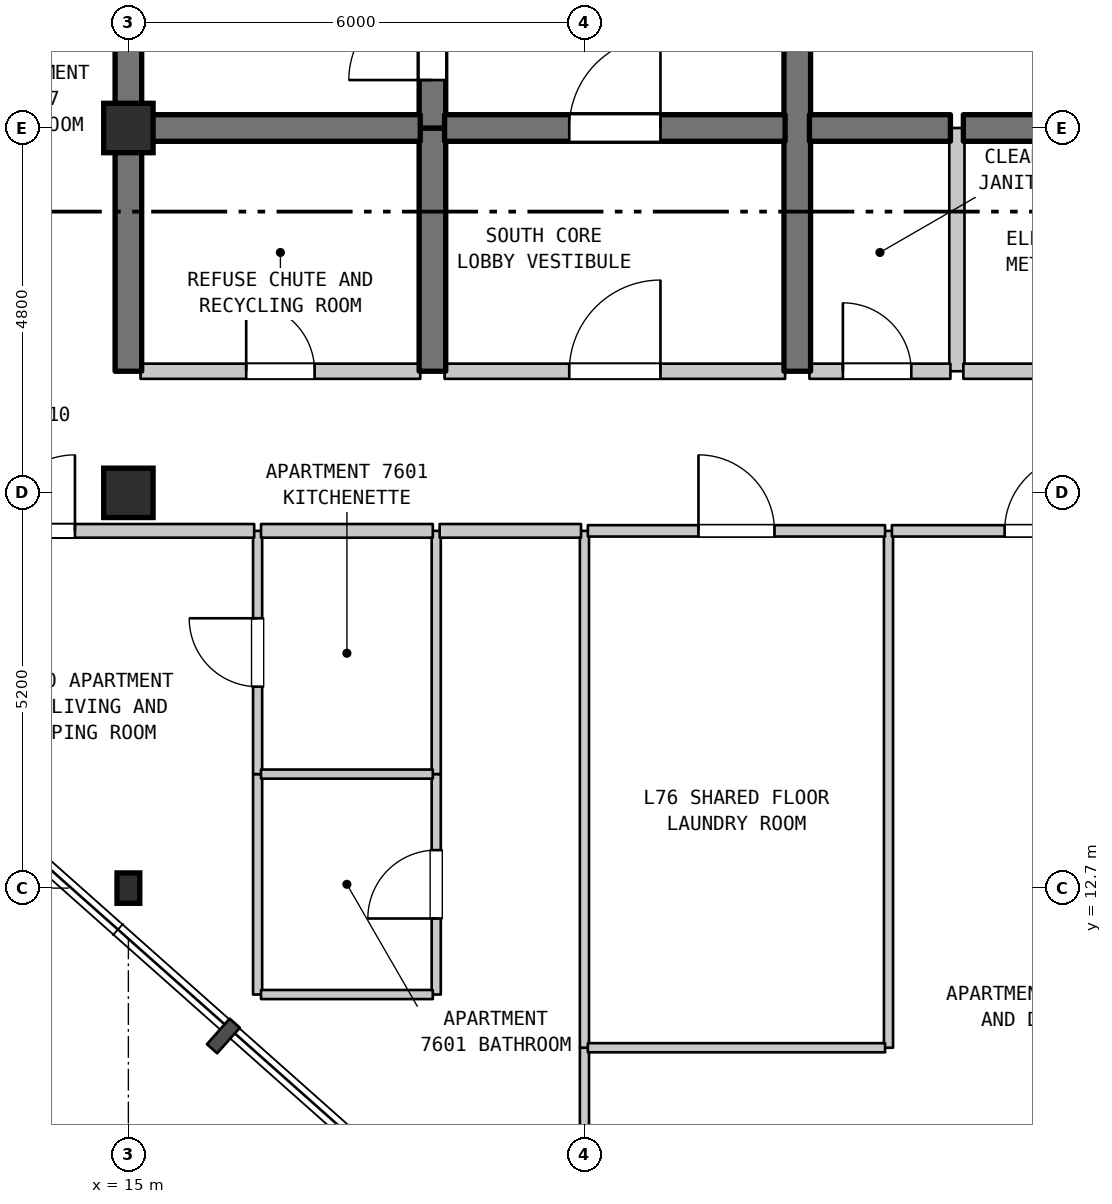
"""IFC4 building model, lengths in metres.
Left out: names, types, materials, properties, quantities, classifications, styles, units other than length and angle.
Written with IfcOpenShell. Run it as: python <this file> out.ifc"""

import sys

from ifc_helpers import new_model, si_unit, direction, frame, frame_2d, origin, origin_2d, place, context, subcontext, project, spatial, rectangle, i_section, extrude, element, fill, save


model = new_model("IFC4")
c1 = context("Model", 3, precision=1e-05, world=origin(), true_north=direction((0.0, 1.0)))
c2 = subcontext(c1, "Body", "Model", "MODEL_VIEW")
j1 = project(units=[si_unit("LENGTHUNIT", "METRE"), si_unit("PLANEANGLEUNIT", "RADIAN")], contexts=[c1])
p1 = place(None, origin())
s1 = spatial("IfcSite", under=j1, at=p1, CompositionType="ELEMENT")
p2 = place(p1, origin())
s2 = spatial("IfcBuilding", under=s1, at=p2, CompositionType="ELEMENT")
p3 = place(p2, frame((0.0, 0.0, 303.6)))
s3 = spatial("IfcBuildingStorey", under=s2, at=p3, CompositionType="ELEMENT", Elevation=303.6)
p4 = place(p3, frame((15.0, 12.7, 0.0), z_axis=(0.0, 0.0, 1.0), x_axis=(1.0, 0.0, 0.0)))
e1 = element("IfcColumn", 1, at=p4, inside=s3, PredefinedType="COLUMN", context=c2, shape_type="SweptSolid", body=[
    extrude(i_section(OverallWidth=0.3, OverallDepth=0.4, WebThickness=0.013, FlangeThickness=0.024, FilletRadius=0.027, at=origin_2d()), origin(), (0.0, 0.0, 1.0), 3.7),
])
for number, where, z_axis, x_axis in (
    (2, (15.0, 17.9, 0.0), (0.0, 0.0, 1.0), (1.0, 0.0, 0.0)),
    (3, (15.0, 22.7, 0.0), (0.0, 0.0, 1.0), (1.0, 0.0, 0.0)),
):
    element("IfcColumn", number, at=place(p3, frame(where, z_axis=z_axis, x_axis=x_axis)), inside=s3, PredefinedType="COLUMN", context=c2, shape_type="SweptSolid", body=[
        extrude(rectangle(XDim=0.65, YDim=0.65, at=origin_2d()), origin(), (0.0, 0.0, 1.0), 3.7),
    ])
p5 = place(p3, frame((15.0, 19.5, 0.0), z_axis=(0.0, 0.0, 1.0), x_axis=(0.0, 1.0, 0.0)))
e4 = element("IfcWall", 4, at=p5, inside=s3, PredefinedType="SHEAR", context=c2, shape_type="SweptSolid", body=[
    extrude(rectangle(XDim=3.2, YDim=0.35, at=frame_2d((1.6, 0.0))), origin(), (0.0, 0.0, 1.0), 3.39),
])
p6 = place(p3, frame((15.0, 22.7, 0.0), z_axis=(0.0, 0.0, 1.0), x_axis=(0.0, 1.0, 0.0)))
e5 = element("IfcWall", 5, at=p6, inside=s3, PredefinedType="SHEAR", context=c2, shape_type="SweptSolid", body=[
    extrude(rectangle(XDim=6.8, YDim=0.35, at=frame_2d((3.4, 0.0))), origin(), (0.0, 0.0, 1.0), 3.39),
])
p7 = place(p3, frame((16.7, 11.3, 0.0), z_axis=(0.0, 0.0, 1.0), x_axis=(0.0, 1.0, 0.0)))
e6 = element("IfcWall", 6, at=p7, inside=s3, PredefinedType="PARTITIONING", context=c2, shape_type="SweptSolid", body=[
    extrude(rectangle(XDim=2.9, YDim=0.12, at=frame_2d((1.45, 0.0))), origin(), (0.0, 0.0, 1.0), 3.39),
])
p8 = place(p3, frame((16.7, 14.2, 0.0), z_axis=(0.0, 0.0, 1.0), x_axis=(0.0, 1.0, 0.0)))
e7 = element("IfcWall", 7, at=p8, inside=s3, PredefinedType="PARTITIONING", context=c2, shape_type="SweptSolid", body=[
    extrude(rectangle(XDim=3.2, YDim=0.12, at=frame_2d((1.6, 0.0))), origin(), (0.0, 0.0, 1.0), 3.39),
])
p9 = place(p8, frame((1.15, 0.0, 0.0)))
e8 = element("IfcOpeningElement", 8, at=p9, cuts=e7, PredefinedType="OPENING", context=c2, shape_type="SweptSolid", body=[
    extrude(rectangle(XDim=0.9, YDim=2.15, at=frame_2d((0.45, 1.075))), frame((0.0, 0.07, 0.0), z_axis=(0.0, -1.0, 0.0), x_axis=(1.0, 0.0, 0.0)), (0.0, 0.0, 1.0), 0.14),
])
p10 = place(p3, frame((19.0, 19.5, 0.0), z_axis=(0.0, 0.0, 1.0), x_axis=(0.0, 1.0, 0.0)))
e9 = element("IfcWall", 9, at=p10, inside=s3, PredefinedType="SHEAR", context=c2, shape_type="SweptSolid", body=[
    extrude(rectangle(XDim=3.2, YDim=0.35, at=frame_2d((1.6, 0.0))), origin(), (0.0, 0.0, 1.0), 3.39),
])
p11 = place(p3, frame((19.0, 22.7, 0.0), z_axis=(0.0, 0.0, 1.0), x_axis=(0.0, 1.0, 0.0)))
e10 = element("IfcWall", 10, at=p11, inside=s3, PredefinedType="SHEAR", context=c2, shape_type="SweptSolid", body=[
    extrude(rectangle(XDim=5.5, YDim=0.35, at=frame_2d((2.75, 0.0))), origin(), (0.0, 0.0, 1.0), 3.39),
])
p12 = place(p11, frame((0.631, 0.0, 0.0)))
e11 = element("IfcOpeningElement", 11, at=p12, cuts=e10, PredefinedType="OPENING", context=c2, shape_type="SweptSolid", body=[
    extrude(rectangle(XDim=1.1, YDim=2.15, at=frame_2d((0.55, 1.075))), frame((0.0, 0.185, 0.0), z_axis=(0.0, -1.0, 0.0), x_axis=(1.0, 0.0, 0.0)), (0.0, 0.0, 1.0), 0.37),
])
p13 = place(p3, frame((19.05, 11.3, 0.0), z_axis=(0.0, 0.0, 1.0), x_axis=(0.0, 1.0, 0.0)))
e12 = element("IfcWall", 12, at=p13, inside=s3, PredefinedType="PARTITIONING", context=c2, shape_type="SweptSolid", body=[
    extrude(rectangle(XDim=2.9, YDim=0.12, at=frame_2d((1.45, 0.0))), origin(), (0.0, 0.0, 1.0), 3.39),
])
p14 = place(p13, frame((1.0, 0.0, 0.0)))
e13 = element("IfcOpeningElement", 13, at=p14, cuts=e12, PredefinedType="OPENING", context=c2, shape_type="SweptSolid", body=[
    extrude(rectangle(XDim=0.9, YDim=2.1, at=frame_2d((0.45, 1.05))), frame((0.0, 0.07, 0.0), z_axis=(0.0, -1.0, 0.0), x_axis=(1.0, 0.0, 0.0)), (0.0, 0.0, 1.0), 0.14),
])
p15 = place(p3, frame((19.05, 14.2, 0.0), z_axis=(0.0, 0.0, 1.0), x_axis=(0.0, 1.0, 0.0)))
e14 = element("IfcWall", 14, at=p15, inside=s3, PredefinedType="PARTITIONING", context=c2, shape_type="SweptSolid", body=[
    extrude(rectangle(XDim=3.2, YDim=0.12, at=frame_2d((1.6, 0.0))), origin(), (0.0, 0.0, 1.0), 3.39),
])
p16 = place(p3, frame((21.0, 6.999, 0.0), z_axis=(0.0, 0.0, 1.0), x_axis=(0.0, 1.0, 0.0)))
e15 = element("IfcWall", 15, at=p16, inside=s3, PredefinedType="PARTITIONING", context=c2, shape_type="SweptSolid", body=[
    extrude(rectangle(XDim=3.601, YDim=0.12, at=frame_2d((1.801, 0.0))), origin(), (0.0, 0.0, 1.0), 3.39),
])
p17 = place(p3, frame((21.0, 10.6, 0.0), z_axis=(0.0, 0.0, 1.0), x_axis=(0.0, 1.0, 0.0)))
e16 = element("IfcWall", 16, at=p17, inside=s3, PredefinedType="PARTITIONING", context=c2, shape_type="SweptSolid", body=[
    extrude(rectangle(XDim=6.8, YDim=0.12, at=frame_2d((3.4, 0.0))), origin(), (0.0, 0.0, 1.0), 3.39),
])
p18 = place(p3, frame((23.8, 19.5, 0.0), z_axis=(0.0, 0.0, 1.0), x_axis=(0.0, 1.0, 0.0)))
e17 = element("IfcWall", 17, at=p18, inside=s3, PredefinedType="SHEAR", context=c2, shape_type="SweptSolid", body=[
    extrude(rectangle(XDim=6.6, YDim=0.35, at=frame_2d((3.3, 0.0))), origin(), (0.0, 0.0, 1.0), 3.39),
])
p19 = place(p18, frame((4.304, 0.0, 0.0)))
e18 = element("IfcOpeningElement", 18, at=p19, cuts=e17, PredefinedType="OPENING", context=c2, shape_type="SweptSolid", body=[
    extrude(rectangle(XDim=0.9, YDim=2.15, at=frame_2d((0.45, 1.075))), frame((0.0, 0.185, 0.0), z_axis=(0.0, -1.0, 0.0), x_axis=(1.0, 0.0, 0.0)), (0.0, 0.0, 1.0), 0.37),
])
p20 = place(p3, frame((25.0, 10.6, 0.0), z_axis=(0.0, 0.0, 1.0), x_axis=(0.0, 1.0, 0.0)))
e19 = element("IfcWall", 19, at=p20, inside=s3, PredefinedType="PARTITIONING", context=c2, shape_type="SweptSolid", body=[
    extrude(rectangle(XDim=6.8, YDim=0.12, at=frame_2d((3.4, 0.0))), origin(), (0.0, 0.0, 1.0), 3.39),
])
p21 = place(p3, frame((25.9, 19.5, 0.0), z_axis=(0.0, 0.0, 1.0), x_axis=(0.0, 1.0, 0.0)))
e20 = element("IfcWall", 20, at=p21, inside=s3, PredefinedType="STANDARD", context=c2, shape_type="SweptSolid", body=[
    extrude(rectangle(XDim=3.2, YDim=0.2, at=frame_2d((1.6, 0.0))), origin(), (0.0, 0.0, 1.0), 3.39),
])
p22 = place(p3, frame((21.045, 10.6, 0.0), z_axis=(0.0, 0.0, 1.0), x_axis=(1.0, 0.0, 0.0)))
e21 = element("IfcWall", 21, at=p22, inside=s3, PredefinedType="PARTITIONING", context=c2, shape_type="SweptSolid", body=[
    extrude(rectangle(XDim=3.91, YDim=0.12, at=frame_2d((1.955, 0.0))), origin(), (0.0, 0.0, 1.0), 3.39),
])
for number, where, z_axis, x_axis in (
    (22, (16.745, 11.3, 0.0), (0.0, 0.0, 1.0), (1.0, 0.0, 0.0)),
    (23, (16.745, 14.2, 0.0), (0.0, 0.0, 1.0), (1.0, 0.0, 0.0)),
):
    element("IfcWall", number, at=place(p3, frame(where, z_axis=z_axis, x_axis=x_axis)), inside=s3, PredefinedType="PARTITIONING", context=c2, shape_type="SweptSolid", body=[
        extrude(rectangle(XDim=2.26, YDim=0.12, at=frame_2d((1.13, 0.0))), origin(), (0.0, 0.0, 1.0), 3.39),
    ])
p23 = place(p3, frame((12.975, 17.4, 0.0), z_axis=(0.0, 0.0, 1.0), x_axis=(1.0, 0.0, 0.0)))
e24 = element("IfcWall", 24, at=p23, inside=s3, PredefinedType="STANDARD", context=c2, shape_type="SweptSolid", body=[
    extrude(rectangle(XDim=3.68, YDim=0.18, at=frame_2d((1.84, 0.0))), origin(), (0.0, 0.0, 1.0), 3.39),
])
p24 = place(p23, frame((0.322, 0.0, 0.0)))
e25 = element("IfcOpeningElement", 25, at=p24, cuts=e24, PredefinedType="OPENING", context=c2, shape_type="SweptSolid", body=[
    extrude(rectangle(XDim=1.0, YDim=2.15, at=frame_2d((0.5, 1.075))), frame((0.0, 0.1, 0.0), z_axis=(0.0, -1.0, 0.0), x_axis=(1.0, 0.0, 0.0)), (0.0, 0.0, 1.0), 0.2),
])
p25 = place(p3, frame((16.745, 17.4, 0.0), z_axis=(0.0, 0.0, 1.0), x_axis=(1.0, 0.0, 0.0)))
e26 = element("IfcWall", 26, at=p25, inside=s3, PredefinedType="STANDARD", context=c2, shape_type="SweptSolid", body=[
    extrude(rectangle(XDim=2.26, YDim=0.18, at=frame_2d((1.13, 0.0))), origin(), (0.0, 0.0, 1.0), 3.39),
])
p26 = place(p3, frame((19.095, 17.4, 0.0), z_axis=(0.0, 0.0, 1.0), x_axis=(1.0, 0.0, 0.0)))
e27 = element("IfcWall", 27, at=p26, inside=s3, PredefinedType="STANDARD", context=c2, shape_type="SweptSolid", body=[
    extrude(rectangle(XDim=1.86, YDim=0.18, at=frame_2d((0.93, 0.0))), origin(), (0.0, 0.0, 1.0), 3.39),
])
p27 = place(p3, frame((21.045, 17.4, 0.0), z_axis=(0.0, 0.0, 1.0), x_axis=(1.0, 0.0, 0.0)))
e28 = element("IfcWall", 28, at=p27, inside=s3, PredefinedType="STANDARD", context=c2, shape_type="SweptSolid", body=[
    extrude(rectangle(XDim=3.91, YDim=0.15, at=frame_2d((1.955, 0.0))), origin(), (0.0, 0.0, 1.0), 3.39),
])
p28 = place(p27, frame((1.455, 0.0, 0.0)))
e29 = element("IfcOpeningElement", 29, at=p28, cuts=e28, PredefinedType="OPENING", context=c2, shape_type="SweptSolid", body=[
    extrude(rectangle(XDim=1.0, YDim=2.15, at=frame_2d((0.5, 1.075))), frame((0.0, 0.085, 0.0), z_axis=(0.0, -1.0, 0.0), x_axis=(1.0, 0.0, 0.0)), (0.0, 0.0, 1.0), 0.17),
])
p29 = place(p3, frame((25.045, 17.4, 0.0), z_axis=(0.0, 0.0, 1.0), x_axis=(1.0, 0.0, 0.0)))
e30 = element("IfcWall", 30, at=p29, inside=s3, PredefinedType="STANDARD", context=c2, shape_type="SweptSolid", body=[
    extrude(rectangle(XDim=4.11, YDim=0.15, at=frame_2d((2.055, 0.0))), origin(), (0.0, 0.0, 1.0), 3.39),
])
p30 = place(p29, frame((1.483, 0.0, 0.0)))
e31 = element("IfcOpeningElement", 31, at=p30, cuts=e30, PredefinedType="OPENING", context=c2, shape_type="SweptSolid", body=[
    extrude(rectangle(XDim=1.0, YDim=2.15, at=frame_2d((0.5, 1.075))), frame((0.0, 0.085, 0.0), z_axis=(0.0, -1.0, 0.0), x_axis=(1.0, 0.0, 0.0)), (0.0, 0.0, 1.0), 0.17),
])
p31 = place(p3, frame((15.16, 19.5, 0.0), z_axis=(0.0, 0.0, 1.0), x_axis=(1.0, 0.0, 0.0)))
e32 = element("IfcWall", 32, at=p31, inside=s3, PredefinedType="STANDARD", context=c2, shape_type="SweptSolid", body=[
    extrude(rectangle(XDim=3.68, YDim=0.2, at=frame_2d((1.84, 0.0))), origin(), (0.0, 0.0, 1.0), 3.39),
])
p32 = place(p31, frame((1.39, 0.0, 0.0)))
e33 = element("IfcOpeningElement", 33, at=p32, cuts=e32, PredefinedType="OPENING", context=c2, shape_type="SweptSolid", body=[
    extrude(rectangle(XDim=0.9, YDim=2.15, at=frame_2d((0.45, 1.075))), frame((0.0, 0.11, 0.0), z_axis=(0.0, -1.0, 0.0), x_axis=(1.0, 0.0, 0.0)), (0.0, 0.0, 1.0), 0.22),
])
p33 = place(p3, frame((19.16, 19.5, 0.0), z_axis=(0.0, 0.0, 1.0), x_axis=(1.0, 0.0, 0.0)))
e34 = element("IfcWall", 34, at=p33, inside=s3, PredefinedType="STANDARD", context=c2, shape_type="SweptSolid", body=[
    extrude(rectangle(XDim=4.48, YDim=0.2, at=frame_2d((2.24, 0.0))), origin(), (0.0, 0.0, 1.0), 3.39),
])
p34 = place(p33, frame((1.64, 0.0, 0.0)))
e35 = element("IfcOpeningElement", 35, at=p34, cuts=e34, PredefinedType="OPENING", context=c2, shape_type="SweptSolid", body=[
    extrude(rectangle(XDim=1.2, YDim=2.2, at=frame_2d((0.6, 1.1))), frame((0.0, 0.11, 0.0), z_axis=(0.0, -1.0, 0.0), x_axis=(1.0, 0.0, 0.0)), (0.0, 0.0, 1.0), 0.22),
])
p35 = place(p3, frame((23.96, 19.5, 0.0), z_axis=(0.0, 0.0, 1.0), x_axis=(1.0, 0.0, 0.0)))
e36 = element("IfcWall", 36, at=p35, inside=s3, PredefinedType="STANDARD", context=c2, shape_type="SweptSolid", body=[
    extrude(rectangle(XDim=1.855, YDim=0.2, at=frame_2d((0.927, 0.0))), origin(), (0.0, 0.0, 1.0), 3.39),
])
p36 = place(p35, frame((0.44, 0.0, 0.0)))
e37 = element("IfcOpeningElement", 37, at=p36, cuts=e36, PredefinedType="OPENING", context=c2, shape_type="SweptSolid", body=[
    extrude(rectangle(XDim=0.9, YDim=2.15, at=frame_2d((0.45, 1.075))), frame((0.0, 0.11, 0.0), z_axis=(0.0, -1.0, 0.0), x_axis=(1.0, 0.0, 0.0)), (0.0, 0.0, 1.0), 0.22),
])
p37 = place(p3, frame((25.985, 19.5, 0.0), z_axis=(0.0, 0.0, 1.0), x_axis=(1.0, 0.0, 0.0)))
e38 = element("IfcWall", 38, at=p37, inside=s3, PredefinedType="STANDARD", context=c2, shape_type="SweptSolid", body=[
    extrude(rectangle(XDim=4.655, YDim=0.2, at=frame_2d((2.327, 0.0))), origin(), (0.0, 0.0, 1.0), 3.39),
])
p38 = place(p37, frame((1.845, 0.0, 0.0)))
e39 = element("IfcOpeningElement", 39, at=p38, cuts=e38, PredefinedType="OPENING", context=c2, shape_type="SweptSolid", body=[
    extrude(rectangle(XDim=0.9, YDim=2.15, at=frame_2d((0.45, 1.075))), frame((0.0, 0.11, 0.0), z_axis=(0.0, -1.0, 0.0), x_axis=(1.0, 0.0, 0.0)), (0.0, 0.0, 1.0), 0.22),
])
p39 = place(p3, frame((15.16, 22.7, 0.0), z_axis=(0.0, 0.0, 1.0), x_axis=(1.0, 0.0, 0.0)))
e40 = element("IfcWall", 40, at=p39, inside=s3, PredefinedType="SHEAR", context=c2, shape_type="SweptSolid", body=[
    extrude(rectangle(XDim=3.68, YDim=0.35, at=frame_2d((1.84, 0.0))), origin(), (0.0, 0.0, 1.0), 3.39),
])
p40 = place(p3, frame((19.16, 22.7, 0.0), z_axis=(0.0, 0.0, 1.0), x_axis=(1.0, 0.0, 0.0)))
e41 = element("IfcWall", 41, at=p40, inside=s3, PredefinedType="SHEAR", context=c2, shape_type="SweptSolid", body=[
    extrude(rectangle(XDim=4.48, YDim=0.35, at=frame_2d((2.24, 0.0))), origin(), (0.0, 0.0, 1.0), 3.39),
])
p41 = place(p40, frame((1.64, 0.0, 0.0)))
e42 = element("IfcOpeningElement", 42, at=p41, cuts=e41, PredefinedType="OPENING", context=c2, shape_type="SweptSolid", body=[
    extrude(rectangle(XDim=1.2, YDim=2.2, at=frame_2d((0.6, 1.1))), frame((0.0, 0.185, 0.0), z_axis=(0.0, -1.0, 0.0), x_axis=(1.0, 0.0, 0.0)), (0.0, 0.0, 1.0), 0.37),
])
p42 = place(p3, frame((23.96, 22.7, 0.0), z_axis=(0.0, 0.0, 1.0), x_axis=(1.0, 0.0, 0.0)))
e43 = element("IfcWall", 43, at=p42, inside=s3, PredefinedType="SHEAR", context=c2, shape_type="SweptSolid", body=[
    extrude(rectangle(XDim=1.855, YDim=0.35, at=frame_2d((0.927, 0.0))), origin(), (0.0, 0.0, 1.0), 3.39),
])
p43 = place(p3, frame((25.985, 22.7, 0.0), z_axis=(0.0, 0.0, 1.0), x_axis=(1.0, 0.0, 0.0)))
e44 = element("IfcWall", 44, at=p43, inside=s3, PredefinedType="SHEAR", context=c2, shape_type="SweptSolid", body=[
    extrude(rectangle(XDim=1.155, YDim=0.35, at=frame_2d((0.577, 0.0))), origin(), (0.0, 0.0, 1.0), 3.39),
])
p44 = place(p9, origin())
e45 = element("IfcDoor", 45, at=p44, inside=s3, OperationType="SINGLE_SWING_RIGHT", PredefinedType="DOOR", context=c2, shape_type="SweptSolid", body=[
    extrude(rectangle(XDim=0.9, YDim=2.15, at=frame_2d((0.45, 1.075))), frame((0.0, 0.025, 0.0), z_axis=(0.0, -1.0, 0.0), x_axis=(1.0, 0.0, 0.0)), (0.0, 0.0, 1.0), 0.05),
])
fill(e8, e45)
p45 = place(p12, origin())
e46 = element("IfcDoor", 46, at=p45, inside=s3, OperationType="SINGLE_SWING_LEFT", PredefinedType="DOOR", context=c2, shape_type="SweptSolid", body=[
    extrude(rectangle(XDim=1.1, YDim=2.15, at=frame_2d((0.55, 1.075))), frame((0.0, 0.025, 0.0), z_axis=(0.0, -1.0, 0.0), x_axis=(1.0, 0.0, 0.0)), (0.0, 0.0, 1.0), 0.05),
])
fill(e11, e46)
p46 = place(p14, origin())
e47 = element("IfcDoor", 47, at=p46, inside=s3, OperationType="SINGLE_SWING_LEFT", PredefinedType="DOOR", context=c2, shape_type="SweptSolid", body=[
    extrude(rectangle(XDim=0.9, YDim=2.1, at=frame_2d((0.45, 1.05))), frame((0.0, 0.025, 0.0), z_axis=(0.0, -1.0, 0.0), x_axis=(1.0, 0.0, 0.0)), (0.0, 0.0, 1.0), 0.05),
])
fill(e13, e47)
p47 = place(p24, origin())
e48 = element("IfcDoor", 48, at=p47, inside=s3, OperationType="SINGLE_SWING_RIGHT", PredefinedType="DOOR", context=c2, shape_type="SweptSolid", body=[
    extrude(rectangle(XDim=1.0, YDim=2.15, at=frame_2d((0.5, 1.075))), frame((0.0, 0.025, 0.0), z_axis=(0.0, -1.0, 0.0), x_axis=(1.0, 0.0, 0.0)), (0.0, 0.0, 1.0), 0.05),
])
fill(e25, e48)
p48 = place(p28, origin())
e49 = element("IfcDoor", 49, at=p48, inside=s3, OperationType="SINGLE_SWING_LEFT", PredefinedType="DOOR", context=c2, shape_type="SweptSolid", body=[
    extrude(rectangle(XDim=1.0, YDim=2.15, at=frame_2d((0.5, 1.075))), frame((0.0, 0.025, 0.0), z_axis=(0.0, -1.0, 0.0), x_axis=(1.0, 0.0, 0.0)), (0.0, 0.0, 1.0), 0.05),
])
fill(e29, e49)
p49 = place(p30, origin())
e50 = element("IfcDoor", 50, at=p49, inside=s3, OperationType="SINGLE_SWING_RIGHT", PredefinedType="DOOR", context=c2, shape_type="SweptSolid", body=[
    extrude(rectangle(XDim=1.0, YDim=2.15, at=frame_2d((0.5, 1.075))), frame((0.0, 0.025, 0.0), z_axis=(0.0, -1.0, 0.0), x_axis=(1.0, 0.0, 0.0)), (0.0, 0.0, 1.0), 0.05),
])
fill(e31, e50)
p50 = place(p32, origin())
e51 = element("IfcDoor", 51, at=p50, inside=s3, OperationType="SINGLE_SWING_LEFT", PredefinedType="DOOR", context=c2, shape_type="SweptSolid", body=[
    extrude(rectangle(XDim=0.9, YDim=2.15, at=frame_2d((0.45, 1.075))), frame((0.0, 0.025, 0.0), z_axis=(0.0, -1.0, 0.0), x_axis=(1.0, 0.0, 0.0)), (0.0, 0.0, 1.0), 0.05),
])
fill(e33, e51)
p51 = place(p34, origin())
e52 = element("IfcDoor", 52, at=p51, inside=s3, OperationType="SINGLE_SWING_RIGHT", PredefinedType="DOOR", context=c2, shape_type="SweptSolid", body=[
    extrude(rectangle(XDim=1.2, YDim=2.2, at=frame_2d((0.6, 1.1))), frame((0.0, 0.025, 0.0), z_axis=(0.0, -1.0, 0.0), x_axis=(1.0, 0.0, 0.0)), (0.0, 0.0, 1.0), 0.05),
])
fill(e35, e52)
p52 = place(p36, origin())
e53 = element("IfcDoor", 53, at=p52, inside=s3, OperationType="SINGLE_SWING_LEFT", PredefinedType="DOOR", context=c2, shape_type="SweptSolid", body=[
    extrude(rectangle(XDim=0.9, YDim=2.15, at=frame_2d((0.45, 1.075))), frame((0.0, 0.025, 0.0), z_axis=(0.0, -1.0, 0.0), x_axis=(1.0, 0.0, 0.0)), (0.0, 0.0, 1.0), 0.05),
])
fill(e37, e53)
p53 = place(p41, origin())
e54 = element("IfcDoor", 54, at=p53, inside=s3, OperationType="SINGLE_SWING_RIGHT", PredefinedType="DOOR", context=c2, shape_type="SweptSolid", body=[
    extrude(rectangle(XDim=1.2, YDim=2.2, at=frame_2d((0.6, 1.1))), frame((0.0, 0.025, 0.0), z_axis=(0.0, -1.0, 0.0), x_axis=(1.0, 0.0, 0.0)), (0.0, 0.0, 1.0), 0.05),
])
fill(e42, e54)
save(model, sys.argv[1])
